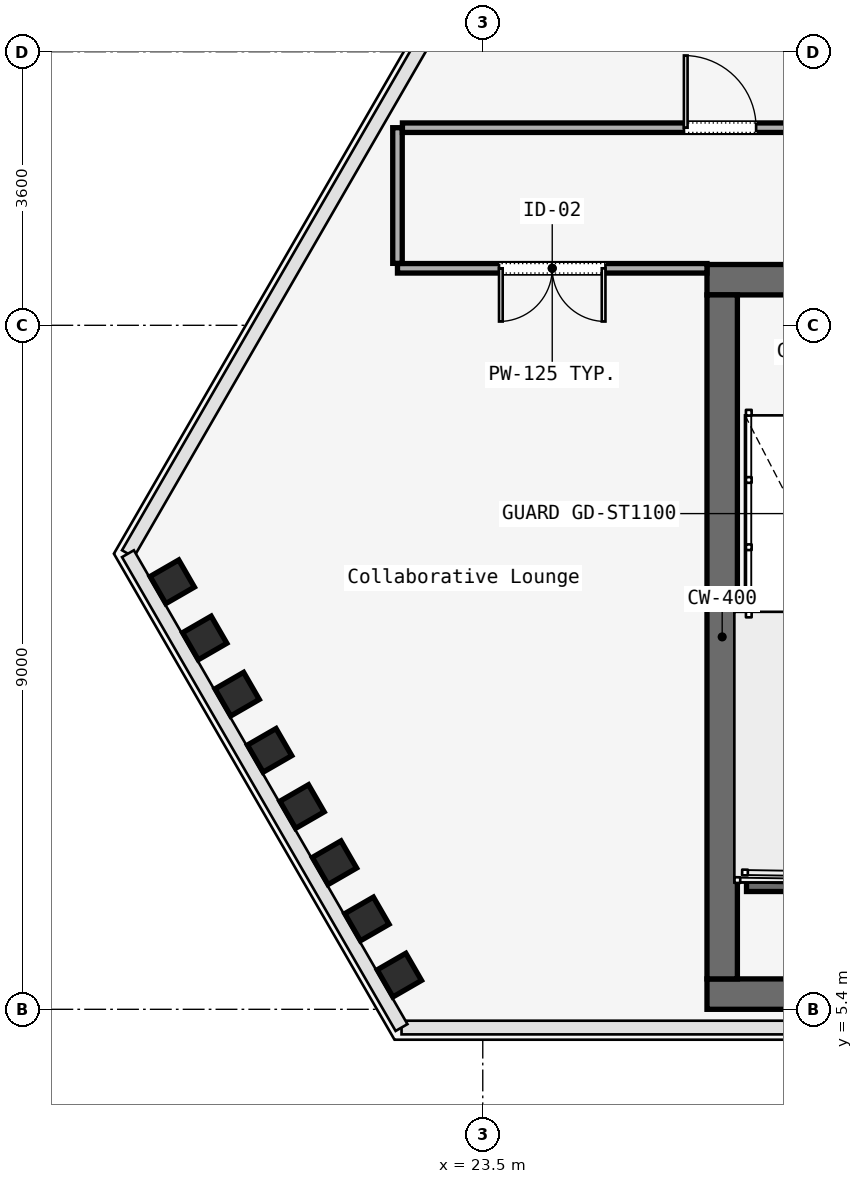
"""IFC4 building model, lengths in metres.
Left out: names, types, materials, properties, quantities, classifications, styles, units other than length and angle.
Written with IfcOpenShell. Run it as: python <this file> out.ifc"""

import sys

from ifc_helpers import new_model, si_unit, direction, frame, frame_2d, origin, origin_2d, place, context, subcontext, project, spatial, rectangle, i_section, extrude, element, fill, save


model = new_model("IFC4")
c1 = context("Model", 3, precision=1e-05, world=origin(), true_north=direction((0.0, 1.0)))
c2 = subcontext(c1, "Body", "Model", "MODEL_VIEW")
j1 = project(units=[si_unit("LENGTHUNIT", "METRE"), si_unit("PLANEANGLEUNIT", "RADIAN")], contexts=[c1])
p1 = place(None, origin())
s1 = spatial("IfcSite", under=j1, at=p1, CompositionType="ELEMENT")
p2 = place(p1, origin())
s2 = spatial("IfcBuilding", under=s1, at=p2, CompositionType="ELEMENT")
p3 = place(p2, frame((0.0, 0.0, 237.0)))
s3 = spatial("IfcBuildingStorey", under=s2, at=p3, CompositionType="ELEMENT", Elevation=237.0)
p4 = place(p3, frame((26.45, 15.0, 0.0), z_axis=(0.0, 0.0, 1.0), x_axis=(1.0, 0.0, 0.0)))
e1 = element("IfcWall", 1, at=p4, inside=s3, PredefinedType="SOLIDWALL", context=c2, shape_type="SweptSolid", body=[
    extrude(rectangle(XDim=31.1, YDim=0.4, at=frame_2d((15.55, 0.0))), origin(), (0.0, 0.0, 1.0), 3.58),
])
p5 = place(p4, frame((1.65, 0.0, 0.0)))
e2 = element("IfcOpeningElement", 2, at=p5, cuts=e1, PredefinedType="OPENING", context=c2, shape_type="SweptSolid", body=[
    extrude(rectangle(XDim=1.1, YDim=2.2, at=frame_2d((0.55, 1.1))), frame((0.0, 0.2, 0.0), z_axis=(0.0, -1.0, 0.0), x_axis=(1.0, 0.0, 0.0)), (0.0, 0.0, 1.0), 0.4),
])
p6 = place(p4, frame((13.65, 0.0, 0.0)))
e3 = element("IfcOpeningElement", 3, at=p6, cuts=e1, PredefinedType="OPENING", context=c2, shape_type="SweptSolid", body=[
    extrude(rectangle(XDim=1.1, YDim=2.2, at=frame_2d((0.55, 1.1))), frame((0.0, 0.2, 0.0), z_axis=(0.0, -1.0, 0.0), x_axis=(1.0, 0.0, 0.0)), (0.0, 0.0, 1.0), 0.4),
])
p7 = place(p4, frame((25.55, 0.0, 0.0)))
e4 = element("IfcOpeningElement", 4, at=p7, cuts=e1, PredefinedType="OPENING", context=c2, shape_type="SweptSolid", body=[
    extrude(rectangle(XDim=1.1, YDim=2.2, at=frame_2d((0.55, 1.1))), frame((0.0, 0.2, 0.0), z_axis=(0.0, -1.0, 0.0), x_axis=(1.0, 0.0, 0.0)), (0.0, 0.0, 1.0), 0.4),
])
p8 = place(p4, frame((19.35, 0.0, 0.0)))
e5 = element("IfcOpeningElement", 5, at=p8, cuts=e1, PredefinedType="OPENING", context=c2, shape_type="SweptSolid", body=[
    extrude(rectangle(XDim=1.1, YDim=2.2, at=frame_2d((0.55, 1.1))), frame((0.0, 0.2, 0.0), z_axis=(0.0, -1.0, 0.0), x_axis=(1.0, 0.0, 0.0)), (0.0, 0.0, 1.0), 0.4),
])
p9 = place(p4, frame((21.4, 0.0, 0.0)))
e6 = element("IfcOpeningElement", 6, at=p9, cuts=e1, PredefinedType="OPENING", context=c2, shape_type="SweptSolid", body=[
    extrude(rectangle(XDim=0.9, YDim=2.1, at=frame_2d((0.45, 1.05))), frame((0.0, 0.2, 0.0), z_axis=(0.0, -1.0, 0.0), x_axis=(1.0, 0.0, 0.0)), (0.0, 0.0, 1.0), 0.4),
])
p10 = place(p4, frame((6.54, 0.0, 0.0)))
e7 = element("IfcOpeningElement", 7, at=p10, cuts=e1, PredefinedType="OPENING", context=c2, shape_type="SweptSolid", body=[
    extrude(rectangle(XDim=0.95, YDim=2.2, at=frame_2d((0.475, 1.1))), frame((0.0, 0.2, 0.0), z_axis=(0.0, -1.0, 0.0), x_axis=(1.0, 0.0, 0.0)), (0.0, 0.0, 1.0), 0.4),
])
p11 = place(p4, frame((10.49, 0.0, 0.0)))
e8 = element("IfcOpeningElement", 8, at=p11, cuts=e1, PredefinedType="OPENING", context=c2, shape_type="SweptSolid", body=[
    extrude(rectangle(XDim=0.95, YDim=2.2, at=frame_2d((0.475, 1.1))), frame((0.0, 0.2, 0.0), z_axis=(0.0, -1.0, 0.0), x_axis=(1.0, 0.0, 0.0)), (0.0, 0.0, 1.0), 0.4),
])
p12 = place(p4, frame((23.35, 0.0, 0.0)))
e9 = element("IfcOpeningElement", 9, at=p12, cuts=e1, PredefinedType="OPENING", context=c2, shape_type="SweptSolid", body=[
    extrude(rectangle(XDim=1.3, YDim=2.3, at=frame_2d((0.65, 1.15))), frame((0.0, 0.2, 0.0), z_axis=(0.0, -1.0, 0.0), x_axis=(1.0, 0.0, 0.0)), (0.0, 0.0, 1.0), 0.4),
])
p13 = place(p3, frame((26.45, 5.6, 0.0), z_axis=(0.0, 0.0, 1.0), x_axis=(1.0, 0.0, 0.0)))
e10 = element("IfcWall", 10, at=p13, inside=s3, PredefinedType="SOLIDWALL", context=c2, shape_type="SweptSolid", body=[
    extrude(rectangle(XDim=31.1, YDim=0.4, at=frame_2d((15.55, 0.0))), origin(), (0.0, 0.0, 1.0), 3.58),
])
p14 = place(p3, frame((26.65, 5.8, 0.0), z_axis=(0.0, 0.0, 1.0), x_axis=(0.0, 1.0, 0.0)))
e11 = element("IfcWall", 11, at=p14, inside=s3, PredefinedType="SOLIDWALL", context=c2, shape_type="SweptSolid", body=[
    extrude(rectangle(XDim=9.0, YDim=0.4, at=frame_2d((4.5, 0.0))), origin(), (0.0, 0.0, 1.0), 3.58),
])
p15 = place(p3, frame((19.415, 11.025, 0.0), z_axis=(0.042676478189, -0.132958837902, 0.990202335704), x_axis=(-0.738156757182, 0.663701816369, 0.120931802166)))
e12 = element("IfcColumn", 12, at=p15, inside=s3, PredefinedType="COLUMN", context=c2, shape_type="SweptSolid", body=[
    extrude(i_section(OverallWidth=0.412, OverallDepth=0.435, WebThickness=0.036, FlangeThickness=0.044, FilletRadius=0.015, at=origin_2d()), origin(), (0.0, 0.0, 1.0), 3.615),
])
p16 = place(p3, frame((19.842, 10.286, 0.0), z_axis=(0.032496501638, -0.115565683949, 0.99276812503), x_axis=(-0.714067106543, 0.692314653831, 0.103964356603)))
e13 = element("IfcColumn", 13, at=p16, inside=s3, PredefinedType="COLUMN", context=c2, shape_type="SweptSolid", body=[
    extrude(i_section(OverallWidth=0.412, OverallDepth=0.435, WebThickness=0.036, FlangeThickness=0.044, FilletRadius=0.015, at=origin_2d()), origin(), (0.0, 0.0, 1.0), 3.606),
])
p17 = place(p3, frame((20.268, 9.546, 0.0), z_axis=(0.022254524787, -0.09797418839, 0.994940095953), x_axis=(-0.678437450751, 0.729487471668, 0.087009505792)))
e14 = element("IfcColumn", 14, at=p17, inside=s3, PredefinedType="COLUMN", context=c2, shape_type="SweptSolid", body=[
    extrude(i_section(OverallWidth=0.412, OverallDepth=0.435, WebThickness=0.036, FlangeThickness=0.044, FilletRadius=0.015, at=origin_2d()), origin(), (0.0, 0.0, 1.0), 3.598),
])
p18 = place(p3, frame((20.695, 8.807, 0.0), z_axis=(0.011962524537, -0.08033922729, 0.996695794395), x_axis=(-0.621671409398, 0.7801131576, 0.070342875091)))
e15 = element("IfcColumn", 15, at=p18, inside=s3, PredefinedType="COLUMN", context=c2, shape_type="SweptSolid", body=[
    extrude(i_section(OverallWidth=0.412, OverallDepth=0.435, WebThickness=0.036, FlangeThickness=0.044, FilletRadius=0.015, at=origin_2d()), origin(), (0.0, 0.0, 1.0), 3.592),
])
p19 = place(p3, frame((21.122, 8.068, 0.0), z_axis=(0.001701514809, -0.062547684371, 0.998040526245), x_axis=(-0.52331914349, 0.850412101912, 0.054187922821)))
e16 = element("IfcColumn", 16, at=p19, inside=s3, PredefinedType="COLUMN", context=c2, shape_type="SweptSolid", body=[
    extrude(i_section(OverallWidth=0.412, OverallDepth=0.435, WebThickness=0.036, FlangeThickness=0.044, FilletRadius=0.015, at=origin_2d()), origin(), (0.0, 0.0, 1.0), 3.587),
])
p20 = place(p3, frame((21.549, 7.328, 0.0), z_axis=(-0.008583570146, -0.044689063616, 0.998964068381), x_axis=(-0.327839496766, 0.943911103758, 0.039409295381)))
e17 = element("IfcColumn", 17, at=p20, inside=s3, PredefinedType="COLUMN", context=c2, shape_type="SweptSolid", body=[
    extrude(i_section(OverallWidth=0.412, OverallDepth=0.435, WebThickness=0.036, FlangeThickness=0.044, FilletRadius=0.015, at=origin_2d()), origin(), (0.0, 0.0, 1.0), 3.584),
])
p21 = place(p3, frame((21.976, 6.589, 0.0), z_axis=(-0.018879617772, -0.026854041163, 0.999461065028), x_axis=(0.088781800771, 0.995645322005, 0.028428588085)))
e18 = element("IfcColumn", 18, at=p21, inside=s3, PredefinedType="COLUMN", context=c2, shape_type="SweptSolid", body=[
    extrude(i_section(OverallWidth=0.412, OverallDepth=0.435, WebThickness=0.036, FlangeThickness=0.044, FilletRadius=0.015, at=origin_2d()), origin(), (0.0, 0.0, 1.0), 3.582),
])
p22 = place(p3, frame((22.403, 5.85, 0.0), z_axis=(-0.029241641936, -0.008929265953, 0.999532488009), x_axis=(0.681858172917, 0.731005012271, 0.026478369666)))
e19 = element("IfcColumn", 19, at=p22, inside=s3, PredefinedType="COLUMN", context=c2, shape_type="SweptSolid", body=[
    extrude(i_section(OverallWidth=0.412, OverallDepth=0.435, WebThickness=0.036, FlangeThickness=0.044, FilletRadius=0.015, at=origin_2d()), origin(), (0.0, 0.0, 1.0), 3.582),
])
p23 = place(p3, frame((26.97, 7.05, 0.0), z_axis=(0.0, 0.0, 1.0), x_axis=(1.0, 0.0, 0.0)))
e20 = element("IfcWall", 20, at=p23, inside=s3, PredefinedType="SOLIDWALL", context=c2, shape_type="SweptSolid", body=[
    extrude(rectangle(XDim=3.115, YDim=0.2, at=frame_2d((1.558, 0.0))), origin(), (0.0, 0.0, 1.0), 3.8),
])
p24 = place(p3, frame((26.45, 15.15, 0.0), z_axis=(0.0, 0.0, 1.0), x_axis=(-1.0, 0.0, 0.0)))
e21 = element("IfcWall", 21, at=p24, inside=s3, PredefinedType="PARTITIONING", context=c2, shape_type="SweptSolid", body=[
    extrude(rectangle(XDim=4.072, YDim=0.125, at=frame_2d((2.036, 0.0))), origin(), (0.0, 0.0, 1.0), 3.01),
])
p25 = place(p24, frame((1.336, 0.0, 0.0)))
e22 = element("IfcOpeningElement", 22, at=p25, cuts=e21, PredefinedType="OPENING", context=c2, shape_type="SweptSolid", body=[
    extrude(rectangle(XDim=1.4, YDim=2.2, at=frame_2d((0.7, 1.1))), frame((0.0, 0.062, 0.0), z_axis=(0.0, -1.0, 0.0), x_axis=(1.0, 0.0, 0.0)), (0.0, 0.0, 1.0), 0.125),
])
p26 = place(p3, frame((22.378, 15.215, 0.0), z_axis=(0.0, 0.0, 1.0), x_axis=(0.0, 1.0, 0.0)))
e23 = element("IfcWall", 23, at=p26, inside=s3, PredefinedType="PARTITIONING", context=c2, shape_type="SweptSolid", body=[
    extrude(rectangle(XDim=1.785, YDim=0.125, at=frame_2d((0.893, 0.0))), origin(), (0.0, 0.0, 1.0), 3.01),
])
p27 = place(p3, frame((22.443, 17.0, 0.0), z_axis=(0.0, 0.0, 1.0), x_axis=(1.0, 0.0, 0.0)))
e24 = element("IfcWall", 24, at=p27, inside=s3, PredefinedType="PARTITIONING", context=c2, shape_type="SweptSolid", body=[
    extrude(rectangle(XDim=8.357, YDim=0.125, at=frame_2d((4.178, 0.0))), origin(), (0.0, 0.0, 1.0), 3.01),
])
p28 = place(p27, frame((3.704, 0.0, 0.0)))
e25 = element("IfcOpeningElement", 25, at=p28, cuts=e24, PredefinedType="OPENING", context=c2, shape_type="SweptSolid", body=[
    extrude(rectangle(XDim=0.95, YDim=2.2, at=frame_2d((0.475, 1.1))), frame((0.0, 0.062, 0.0), z_axis=(0.0, -1.0, 0.0), x_axis=(1.0, 0.0, 0.0)), (0.0, 0.0, 1.0), 0.125),
])
p29 = place(p25, origin())
e26 = element("IfcDoor", 26, at=p29, inside=s3, OperationType="SINGLE_SWING_RIGHT", PredefinedType="DOOR", context=c2, shape_type="SweptSolid", body=[
    extrude(rectangle(XDim=1.4, YDim=2.2, at=frame_2d((0.7, 1.1))), frame((0.0, 0.025, 0.0), z_axis=(0.0, -1.0, 0.0), x_axis=(1.0, 0.0, 0.0)), (0.0, 0.0, 1.0), 0.05),
])
fill(e22, e26)
p30 = place(p28, origin())
e27 = element("IfcDoor", 27, at=p30, inside=s3, OperationType="SINGLE_SWING_LEFT", PredefinedType="DOOR", context=c2, shape_type="SweptSolid", body=[
    extrude(rectangle(XDim=0.95, YDim=2.2, at=frame_2d((0.475, 1.1))), frame((0.0, 0.025, 0.0), z_axis=(0.0, -1.0, 0.0), x_axis=(1.0, 0.0, 0.0)), (0.0, 0.0, 1.0), 0.05),
])
fill(e25, e27)
save(model, sys.argv[1])
